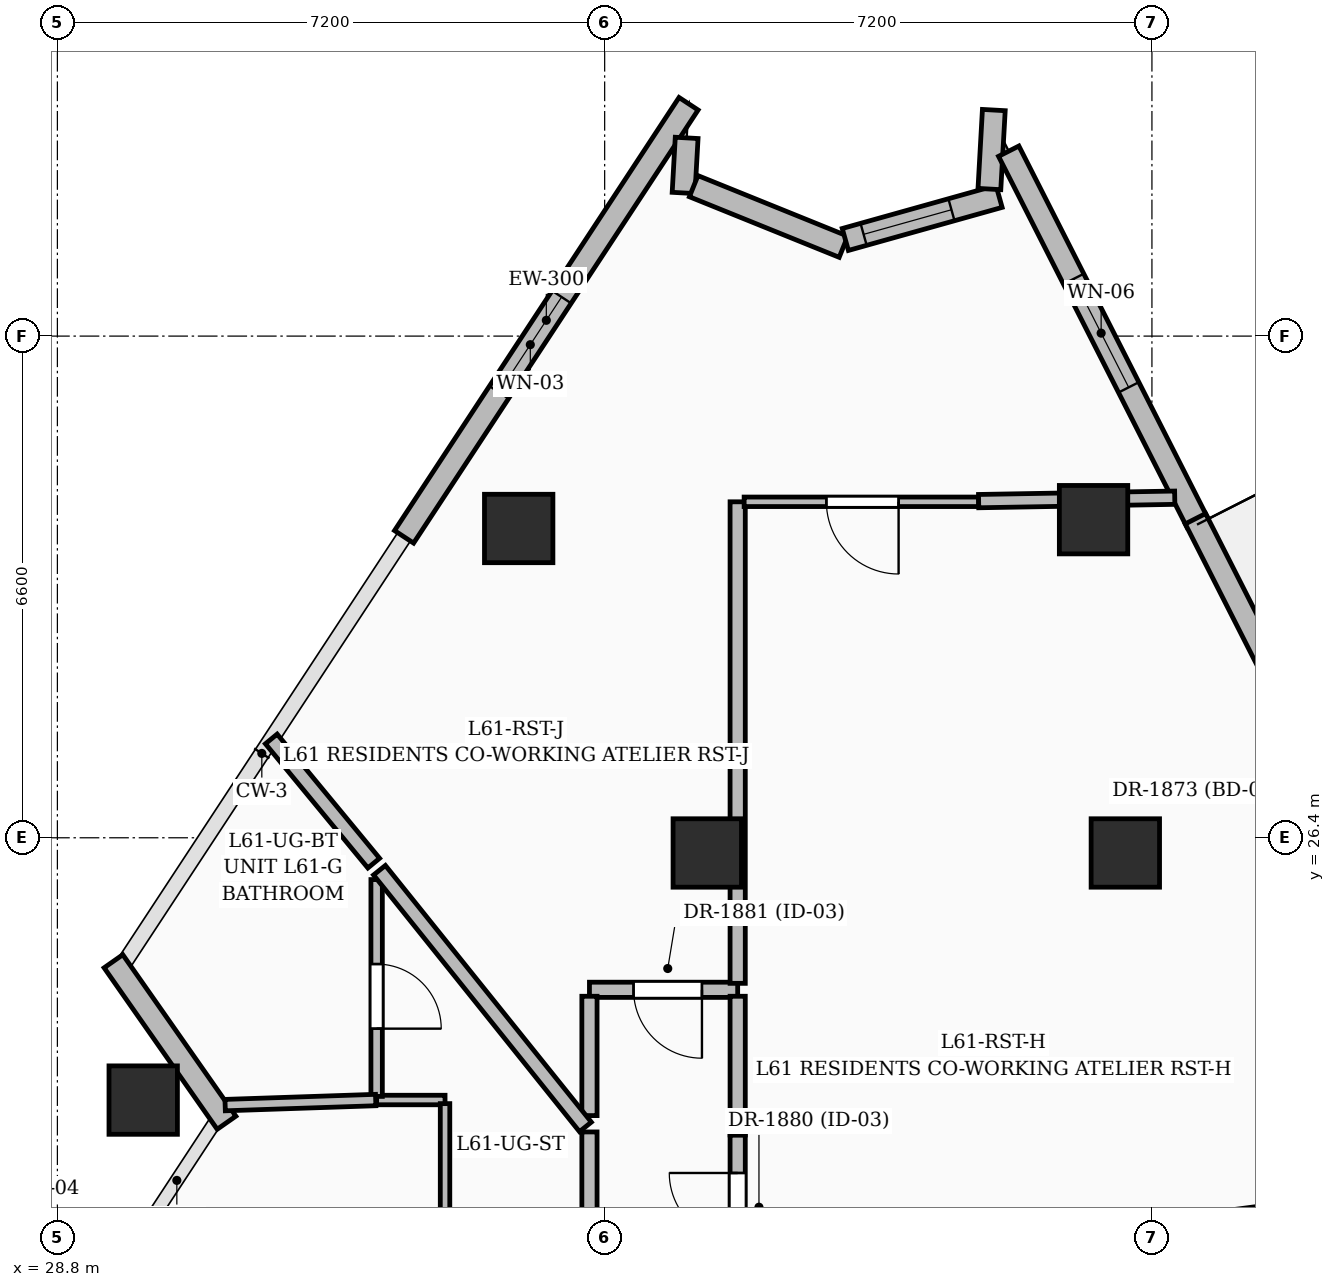
"""IFC4 building model, lengths in metres.
Left out: names, types, materials, properties, quantities, classifications, styles, units other than length and angle.
Written with IfcOpenShell. Run it as: python <this file> out.ifc"""

import sys

from ifc_helpers import new_model, si_unit, direction, frame, frame_2d, origin, origin_2d, place, context, subcontext, project, spatial, rectangle, extrude, element, fill, save


model = new_model("IFC4")
c1 = context("Model", 3, precision=1e-05, world=origin(), true_north=direction((0.0, 1.0)))
c2 = subcontext(c1, "Body", "Model", "MODEL_VIEW")
j1 = project(units=[si_unit("LENGTHUNIT", "METRE"), si_unit("PLANEANGLEUNIT", "RADIAN")], contexts=[c1])
p1 = place(None, origin())
s1 = spatial("IfcSite", under=j1, at=p1, CompositionType="ELEMENT")
p2 = place(p1, origin())
s2 = spatial("IfcBuilding", under=s1, at=p2, CompositionType="ELEMENT")
p3 = place(p2, frame((0.0, 0.0, 237.0)))
s3 = spatial("IfcBuildingStorey", under=s2, at=p3, CompositionType="ELEMENT", Elevation=237.0)
for number, where, z_axis, x_axis in (
    (1, (42.85, 26.2, 0.0), (0.0, 0.0, 1.0), (1.0, 0.0, 0.0)),
    (2, (37.35, 26.2, 0.0), (0.0, 0.0, 1.0), (1.0, 0.0, 0.0)),
    (3, (42.432, 30.585, 0.0), (0.0, 0.0, 1.0), (1.0, 0.0, 0.0)),
    (4, (34.869, 30.469, 0.0), (0.0, 0.0, 1.0), (1.0, 0.0, 0.0)),
    (5, (29.929, 22.949, 0.0), (0.0, 0.0, 1.0), (1.0, 0.0, 0.0)),
):
    element("IfcColumn", number, at=place(p3, frame(where, z_axis=z_axis, x_axis=x_axis)), inside=s3, PredefinedType="COLUMN", context=c2, shape_type="SweptSolid", body=[
        extrude(rectangle(XDim=0.9, YDim=0.9, at=origin_2d()), origin(), (0.0, 0.0, 1.0), 3.75),
    ])
p4 = place(p3, frame((27.394, 21.513, 0.0), z_axis=(0.0, 0.0, 1.0), x_axis=(0.979513310411, -0.201379429751, 0.0)))
e6 = element("IfcWall", 6, at=p4, inside=s3, PredefinedType="SOLIDWALL", context=c2, shape_type="SweptSolid", body=[
    extrude(rectangle(XDim=2.594, YDim=0.3, at=frame_2d((1.297, 0.0))), origin(), (0.0, 0.0, 1.0), 2.825),
])
p5 = place(p4, frame((0.675, 0.0, 0.8)))
e7 = element("IfcOpeningElement", 7, at=p5, cuts=e6, PredefinedType="OPENING", context=c2, shape_type="SweptSolid", body=[
    extrude(rectangle(XDim=1.2, YDim=1.8, at=frame_2d((0.6, 0.9))), frame((0.0, 0.16, 0.0), z_axis=(0.0, -1.0, 0.0), x_axis=(1.0, 0.0, 0.0)), (0.0, 0.0, 1.0), 0.32),
])
p6 = place(p3, frame((31.025, 22.651, 0.0), z_axis=(0.0, 0.0, 1.0), x_axis=(-0.573670817112, 0.819085950065, 0.0)))
e8 = element("IfcWall", 8, at=p6, inside=s3, PredefinedType="SOLIDWALL", context=c2, shape_type="SweptSolid", body=[
    extrude(rectangle(XDim=2.594, YDim=0.3, at=frame_2d((1.297, 0.0))), origin(), (0.0, 0.0, 1.0), 2.825),
])
p7 = place(p3, frame((33.361, 30.359, 0.0), z_axis=(0.0, 0.0, 1.0), x_axis=(0.549026383074, 0.83580501954, 0.0)))
e9 = element("IfcWall", 9, at=p7, inside=s3, PredefinedType="SOLIDWALL", context=c2, shape_type="SweptSolid", body=[
    extrude(rectangle(XDim=6.817, YDim=0.3, at=frame_2d((3.409, 0.0))), origin(), (0.0, 0.0, 1.0), 3.5),
])
p8 = place(p7, frame((2.275, 0.0, 0.6)))
e10 = element("IfcOpeningElement", 10, at=p8, cuts=e9, PredefinedType="OPENING", context=c2, shape_type="SweptSolid", body=[
    extrude(rectangle(XDim=1.5, YDim=2.1, at=frame_2d((0.75, 1.05))), frame((0.0, 0.16, 0.0), z_axis=(0.0, -1.0, 0.0), x_axis=(1.0, 0.0, 0.0)), (0.0, 0.0, 1.0), 0.32),
])
p9 = place(p3, frame((37.079, 35.608, 0.0), z_axis=(0.0, 0.0, 1.0), x_axis=(-0.056196862548, -0.998419707658, 0.0)))
e11 = element("IfcWall", 11, at=p9, inside=s3, PredefinedType="SOLIDWALL", context=c2, shape_type="SweptSolid", body=[
    extrude(rectangle(XDim=0.726, YDim=0.3, at=frame_2d((0.363, 0.0))), origin(), (0.0, 0.0, 1.0), 3.5),
])
p10 = place(p3, frame((37.171, 34.972, 0.0), z_axis=(0.0, 0.0, 1.0), x_axis=(0.927076098221, -0.37487318937, 0.0)))
e12 = element("IfcWall", 12, at=p10, inside=s3, PredefinedType="SOLIDWALL", context=c2, shape_type="SweptSolid", body=[
    extrude(rectangle(XDim=2.126, YDim=0.3, at=frame_2d((1.063, 0.0))), origin(), (0.0, 0.0, 1.0), 3.5),
])
p11 = place(p3, frame((39.166, 34.271, 0.0), z_axis=(0.0, 0.0, 1.0), x_axis=(0.962897602702, 0.269867016714, 0.0)))
e13 = element("IfcWall", 13, at=p11, inside=s3, PredefinedType="SOLIDWALL", context=c2, shape_type="SweptSolid", body=[
    extrude(rectangle(XDim=2.101, YDim=0.3, at=frame_2d((1.05, 0.0))), origin(), (0.0, 0.0, 1.0), 3.5),
])
p12 = place(p11, frame((0.25, 0.0, 0.8)))
e14 = element("IfcOpeningElement", 14, at=p12, cuts=e13, PredefinedType="OPENING", context=c2, shape_type="SweptSolid", body=[
    extrude(rectangle(XDim=1.2, YDim=1.8, at=frame_2d((0.6, 0.9))), frame((0.0, 0.16, 0.0), z_axis=(0.0, -1.0, 0.0), x_axis=(1.0, 0.0, 0.0)), (0.0, 0.0, 1.0), 0.32),
])
p13 = place(p3, frame((41.062, 34.935, 0.0), z_axis=(0.0, 0.0, 1.0), x_axis=(0.056067679965, 0.998426970421, 0.0)))
e15 = element("IfcWall", 15, at=p13, inside=s3, PredefinedType="SOLIDWALL", context=c2, shape_type="SweptSolid", body=[
    extrude(rectangle(XDim=1.041, YDim=0.3, at=frame_2d((0.521, 0.0))), origin(), (0.0, 0.0, 1.0), 3.5),
])
p14 = place(p3, frame((41.316, 35.433, 0.0), z_axis=(0.0, 0.0, 1.0), x_axis=(0.452857019938, -0.891583153437, 0.0)))
e16 = element("IfcWall", 16, at=p14, inside=s3, PredefinedType="SOLIDWALL", context=c2, shape_type="SweptSolid", body=[
    extrude(rectangle(XDim=5.477, YDim=0.3, at=frame_2d((2.738, 0.0))), origin(), (0.0, 0.0, 1.0), 3.5),
])
p15 = place(p14, frame((1.885, 0.0, 0.55)))
e17 = element("IfcOpeningElement", 17, at=p15, cuts=e16, PredefinedType="OPENING", context=c2, shape_type="SweptSolid", body=[
    extrude(rectangle(XDim=1.6, YDim=2.2, at=frame_2d((0.8, 1.1))), frame((0.0, 0.16, 0.0), z_axis=(0.0, -1.0, 0.0), x_axis=(1.0, 0.0, 0.0)), (0.0, 0.0, 1.0), 0.32),
])
p16 = place(p3, frame((43.772, 30.597, 0.0), z_axis=(0.0, 0.0, 1.0), x_axis=(0.452885591854, -0.891568640482, 0.0)))
e18 = element("IfcWall", 18, at=p16, inside=s3, PredefinedType="SOLIDWALL", context=c2, shape_type="SweptSolid", body=[
    extrude(rectangle(XDim=6.12, YDim=0.3, at=frame_2d((3.06, 0.0))), origin(), (0.0, 0.0, 1.0), 3.5),
])
p17 = place(p16, frame((2.278, 0.0, 0.0)))
e19 = element("IfcOpeningElement", 19, at=p17, cuts=e18, PredefinedType="OPENING", context=c2, shape_type="SweptSolid", body=[
    extrude(rectangle(XDim=1.0, YDim=2.2, at=frame_2d((0.5, 1.1))), frame((0.0, 0.16, 0.0), z_axis=(0.0, -1.0, 0.0), x_axis=(1.0, 0.0, 0.0)), (0.0, 0.0, 1.0), 0.32),
])
p18 = place(p3, frame((35.8, 22.53, 0.0), z_axis=(0.0, 0.0, 1.0), x_axis=(0.0, -1.0, 0.0)))
e20 = element("IfcWall", 20, at=p18, inside=s3, PredefinedType="PARTITIONING", context=c2, shape_type="SweptSolid", body=[
    extrude(rectangle(XDim=3.83, YDim=0.2, at=frame_2d((1.915, 0.0))), origin(), (0.0, 0.0, 1.0), 3.003),
])
p19 = place(p18, frame((1.415, 0.0, 0.0)))
e21 = element("IfcOpeningElement", 21, at=p19, cuts=e20, PredefinedType="OPENING", context=c2, shape_type="SweptSolid", body=[
    extrude(rectangle(XDim=1.0, YDim=2.2, at=frame_2d((0.5, 1.1))), frame((0.0, 0.11, 0.0), z_axis=(0.0, -1.0, 0.0), x_axis=(1.0, 0.0, 0.0)), (0.0, 0.0, 1.0), 0.22),
])
p20 = place(p3, frame((37.75, 20.59, 0.0), z_axis=(0.0, 0.0, 1.0), x_axis=(0.0, 1.0, 0.0)))
e22 = element("IfcWall", 22, at=p20, inside=s3, PredefinedType="PARTITIONING", context=c2, shape_type="SweptSolid", body=[
    extrude(rectangle(XDim=1.9, YDim=0.2, at=frame_2d((0.95, 0.0))), origin(), (0.0, 0.0, 1.0), 3.5),
])
p21 = place(p20, frame((0.5, 0.0, 0.0)))
e23 = element("IfcOpeningElement", 23, at=p21, cuts=e22, PredefinedType="OPENING", context=c2, shape_type="SweptSolid", body=[
    extrude(rectangle(XDim=0.9, YDim=2.1, at=frame_2d((0.45, 1.05))), frame((0.0, 0.11, 0.0), z_axis=(0.0, -1.0, 0.0), x_axis=(1.0, 0.0, 0.0)), (0.0, 0.0, 1.0), 0.22),
])
p22 = place(p3, frame((37.75, 24.4, 0.0), z_axis=(0.0, 0.0, 1.0), x_axis=(-1.0, 0.0, 0.0)))
e24 = element("IfcWall", 24, at=p22, inside=s3, PredefinedType="PARTITIONING", context=c2, shape_type="SweptSolid", body=[
    extrude(rectangle(XDim=1.95, YDim=0.2, at=frame_2d((0.975, 0.0))), origin(), (0.0, 0.0, 1.0), 2.685),
])
p23 = place(p22, frame((0.47, 0.0, 0.0)))
e25 = element("IfcOpeningElement", 25, at=p23, cuts=e24, PredefinedType="OPENING", context=c2, shape_type="SweptSolid", body=[
    extrude(rectangle(XDim=0.9, YDim=2.1, at=frame_2d((0.45, 1.05))), frame((0.0, 0.11, 0.0), z_axis=(0.0, -1.0, 0.0), x_axis=(1.0, 0.0, 0.0)), (0.0, 0.0, 1.0), 0.22),
])
p24 = place(p3, frame((35.8, 24.315, 0.0), z_axis=(0.0, 0.0, 1.0), x_axis=(0.0, -1.0, 0.0)))
e26 = element("IfcWall", 26, at=p24, inside=s3, PredefinedType="PARTITIONING", context=c2, shape_type="SweptSolid", body=[
    extrude(rectangle(XDim=1.57, YDim=0.2, at=frame_2d((0.785, 0.0))), origin(), (0.0, 0.0, 1.0), 2.685),
])
p25 = place(p3, frame((37.75, 22.49, 0.0), z_axis=(0.0, 0.0, 1.0), x_axis=(0.0, 1.0, 0.0)))
e27 = element("IfcWall", 27, at=p25, inside=s3, PredefinedType="PARTITIONING", context=c2, shape_type="SweptSolid", body=[
    extrude(rectangle(XDim=1.825, YDim=0.2, at=frame_2d((0.913, 0.0))), origin(), (0.0, 0.0, 1.0), 3.5),
])
p26 = place(p3, frame((48.068, 21.905, 0.0), z_axis=(0.0, 0.0, 1.0), x_axis=(-0.991511595064, -0.130018294302, 0.0)))
e28 = element("IfcWall", 28, at=p26, inside=s3, PredefinedType="PARTITIONING", context=c2, shape_type="SweptSolid", body=[
    extrude(rectangle(XDim=4.749, YDim=0.2, at=frame_2d((2.375, 0.0))), origin(), (0.0, 0.0, 1.0), 2.685),
])
p27 = place(p3, frame((33.0, 22.95, 0.0), z_axis=(0.0, 0.0, 1.0), x_axis=(1.0, 0.0, 0.0)))
e29 = element("IfcWall", 29, at=p27, inside=s3, PredefinedType="PARTITIONING", context=c2, shape_type="SweptSolid", body=[
    extrude(rectangle(XDim=0.9, YDim=0.125, at=frame_2d((0.45, 0.0))), origin(), (0.0, 0.0, 1.0), 3.16),
])
p28 = place(p3, frame((33.9, 22.903, 0.0), z_axis=(0.0, 0.0, 1.0), x_axis=(0.0, -1.0, 0.0)))
e30 = element("IfcWall", 30, at=p28, inside=s3, PredefinedType="PARTITIONING", context=c2, shape_type="SweptSolid", body=[
    extrude(rectangle(XDim=4.118, YDim=0.125, at=frame_2d((2.059, 0.0))), origin(), (0.0, 0.0, 1.0), 2.685),
])
p29 = place(p28, frame((1.603, 0.0, 0.0)))
e31 = element("IfcOpeningElement", 31, at=p29, cuts=e30, PredefinedType="OPENING", context=c2, shape_type="SweptSolid", body=[
    extrude(rectangle(XDim=0.95, YDim=2.2, at=frame_2d((0.475, 1.1))), frame((0.0, 0.072, 0.0), z_axis=(0.0, -1.0, 0.0), x_axis=(1.0, 0.0, 0.0)), (0.0, 0.0, 1.0), 0.145),
])
p30 = place(p3, frame((33.0, 25.85, 0.0), z_axis=(0.0, 0.0, 1.0), x_axis=(0.0, -1.0, 0.0)))
e32 = element("IfcWall", 32, at=p30, inside=s3, PredefinedType="PARTITIONING", context=c2, shape_type="SweptSolid", body=[
    extrude(rectangle(XDim=2.853, YDim=0.15, at=frame_2d((1.426, 0.0))), origin(), (0.0, 0.0, 1.0), 3.16),
])
p31 = place(p30, frame((1.111, 0.0, 0.0)))
e33 = element("IfcOpeningElement", 33, at=p31, cuts=e32, PredefinedType="OPENING", context=c2, shape_type="SweptSolid", body=[
    extrude(rectangle(XDim=0.85, YDim=2.1, at=frame_2d((0.425, 1.05))), frame((0.0, 0.085, 0.0), z_axis=(0.0, -1.0, 0.0), x_axis=(1.0, 0.0, 0.0)), (0.0, 0.0, 1.0), 0.17),
])
p32 = place(p3, frame((35.747, 22.596, 0.0), z_axis=(0.0, 0.0, 1.0), x_axis=(-0.625774137293, 0.780004313511, 0.0)))
e34 = element("IfcWall", 34, at=p32, inside=s3, PredefinedType="PARTITIONING", context=c2, shape_type="SweptSolid", body=[
    extrude(rectangle(XDim=4.329, YDim=0.2, at=frame_2d((2.165, 0.0))), origin(), (0.0, 0.0, 1.0), 2.685),
])
p33 = place(p3, frame((32.988, 22.95, 0.0), z_axis=(0.0, 0.0, 1.0), x_axis=(-0.999434189894, -0.033634804468, 0.0)))
e35 = element("IfcWall", 35, at=p33, inside=s3, PredefinedType="PARTITIONING", context=c2, shape_type="SweptSolid", body=[
    extrude(rectangle(XDim=1.982, YDim=0.15, at=frame_2d((0.991, 0.0))), origin(), (0.0, 0.0, 1.0), 3.16),
])
p34 = place(p3, frame((32.962, 26.066, 0.0), z_axis=(0.0, 0.0, 1.0), x_axis=(-0.636446400214, 0.771320931685, 0.0)))
e36 = element("IfcWall", 36, at=p34, inside=s3, PredefinedType="PARTITIONING", context=c2, shape_type="SweptSolid", body=[
    extrude(rectangle(XDim=2.118, YDim=0.2, at=frame_2d((1.059, 0.0))), origin(), (0.0, 0.0, 1.0), 2.82),
])
p35 = place(p3, frame((37.75, 24.485, 0.0), z_axis=(0.0, 0.0, 1.0), x_axis=(0.0, 1.0, 0.0)))
e37 = element("IfcWall", 37, at=p35, inside=s3, PredefinedType="PARTITIONING", context=c2, shape_type="SweptSolid", body=[
    extrude(rectangle(XDim=6.335, YDim=0.2, at=frame_2d((3.167, 0.0))), origin(), (0.0, 0.0, 1.0), 2.685),
])
p36 = place(p3, frame((40.92, 30.82, 0.0), z_axis=(0.0, 0.0, 1.0), x_axis=(-1.0, 0.0, 0.0)))
e38 = element("IfcWall", 38, at=p36, inside=s3, PredefinedType="PARTITIONING", context=c2, shape_type="SweptSolid", body=[
    extrude(rectangle(XDim=3.085, YDim=0.125, at=frame_2d((1.542, 0.0))), origin(), (0.0, 0.0, 1.0), 2.82),
])
p37 = place(p36, frame((1.053, 0.0, 0.0)))
e39 = element("IfcOpeningElement", 39, at=p37, cuts=e38, PredefinedType="OPENING", context=c2, shape_type="SweptSolid", body=[
    extrude(rectangle(XDim=0.95, YDim=2.2, at=frame_2d((0.475, 1.1))), frame((0.0, 0.072, 0.0), z_axis=(0.0, -1.0, 0.0), x_axis=(1.0, 0.0, 0.0)), (0.0, 0.0, 1.0), 0.145),
])
p38 = place(p3, frame((43.5, 30.874, 0.0), z_axis=(0.0, 0.0, 1.0), x_axis=(-0.999848462083, -0.017408413799, 0.0)))
e40 = element("IfcWall", 40, at=p38, inside=s3, PredefinedType="PARTITIONING", context=c2, shape_type="SweptSolid", body=[
    extrude(rectangle(XDim=2.581, YDim=0.175, at=frame_2d((1.29, 0.0))), origin(), (0.0, 0.0, 1.0), 2.82),
])
p39 = place(p8, origin())
e41 = element("IfcWindow", 41, at=p39, inside=s3, PartitioningType="SINGLE_PANEL", PredefinedType="WINDOW", context=c2, shape_type="SweptSolid", body=[
    extrude(rectangle(XDim=1.5, YDim=2.1, at=frame_2d((0.75, 1.05))), frame((0.0, 0.03, 0.0), z_axis=(0.0, -1.0, 0.0), x_axis=(1.0, 0.0, 0.0)), (0.0, 0.0, 1.0), 0.06),
])
fill(e10, e41)
p40 = place(p12, origin())
e42 = element("IfcWindow", 42, at=p40, inside=s3, PartitioningType="SINGLE_PANEL", PredefinedType="WINDOW", context=c2, shape_type="SweptSolid", body=[
    extrude(rectangle(XDim=1.2, YDim=1.8, at=frame_2d((0.6, 0.9))), frame((0.0, 0.03, 0.0), z_axis=(0.0, -1.0, 0.0), x_axis=(1.0, 0.0, 0.0)), (0.0, 0.0, 1.0), 0.06),
])
fill(e14, e42)
p41 = place(p15, origin())
e43 = element("IfcWindow", 43, at=p41, inside=s3, PartitioningType="SINGLE_PANEL", PredefinedType="WINDOW", context=c2, shape_type="SweptSolid", body=[
    extrude(rectangle(XDim=1.6, YDim=2.2, at=frame_2d((0.8, 1.1))), frame((0.0, 0.03, 0.0), z_axis=(0.0, -1.0, 0.0), x_axis=(1.0, 0.0, 0.0)), (0.0, 0.0, 1.0), 0.06),
])
fill(e17, e43)
p42 = place(p21, origin())
e44 = element("IfcDoor", 44, at=p42, inside=s3, OperationType="SINGLE_SWING_RIGHT", PredefinedType="DOOR", context=c2, shape_type="SweptSolid", body=[
    extrude(rectangle(XDim=0.9, YDim=2.1, at=frame_2d((0.45, 1.05))), frame((0.0, 0.025, 0.0), z_axis=(0.0, -1.0, 0.0), x_axis=(1.0, 0.0, 0.0)), (0.0, 0.0, 1.0), 0.05),
])
fill(e23, e44)
p43 = place(p23, origin())
e45 = element("IfcDoor", 45, at=p43, inside=s3, OperationType="SINGLE_SWING_LEFT", PredefinedType="DOOR", context=c2, shape_type="SweptSolid", body=[
    extrude(rectangle(XDim=0.9, YDim=2.1, at=frame_2d((0.45, 1.05))), frame((0.0, 0.025, 0.0), z_axis=(0.0, -1.0, 0.0), x_axis=(1.0, 0.0, 0.0)), (0.0, 0.0, 1.0), 0.05),
])
fill(e25, e45)
p44 = place(p31, origin())
e46 = element("IfcDoor", 46, at=p44, inside=s3, OperationType="SINGLE_SWING_RIGHT", PredefinedType="DOOR", context=c2, shape_type="SweptSolid", body=[
    extrude(rectangle(XDim=0.85, YDim=2.1, at=frame_2d((0.425, 1.05))), frame((0.0, 0.025, 0.0), z_axis=(0.0, -1.0, 0.0), x_axis=(1.0, 0.0, 0.0)), (0.0, 0.0, 1.0), 0.05),
])
fill(e33, e46)
p45 = place(p37, origin())
e47 = element("IfcDoor", 47, at=p45, inside=s3, OperationType="SINGLE_SWING_LEFT", PredefinedType="DOOR", context=c2, shape_type="SweptSolid", body=[
    extrude(rectangle(XDim=0.95, YDim=2.2, at=frame_2d((0.475, 1.1))), frame((0.0, 0.025, 0.0), z_axis=(0.0, -1.0, 0.0), x_axis=(1.0, 0.0, 0.0)), (0.0, 0.0, 1.0), 0.05),
])
fill(e39, e47)
save(model, sys.argv[1])
